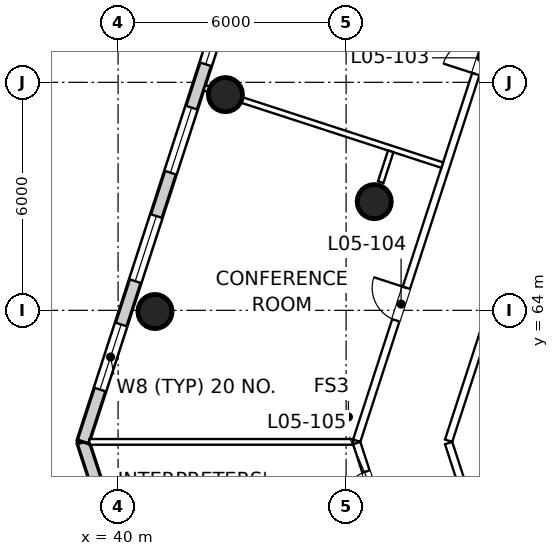
"""IFC4 building model, lengths in metres.
Left out: names, types, materials, properties, quantities, classifications, styles, units other than length and angle.
Written with IfcOpenShell. Run it as: python <this file> out.ifc"""

import sys

from ifc_helpers import new_model, si_unit, direction, frame, frame_2d, origin, origin_2d, place, context, subcontext, project, spatial, rectangle, circle, extrude, element, fill, save


model = new_model("IFC4")
c1 = context("Model", 3, precision=1e-05, world=origin(), true_north=direction((0.0, 1.0)))
c2 = subcontext(c1, "Body", "Model", "MODEL_VIEW")
j1 = project(units=[si_unit("LENGTHUNIT", "METRE"), si_unit("PLANEANGLEUNIT", "RADIAN")], contexts=[c1])
p1 = place(None, origin())
s1 = spatial("IfcSite", under=j1, at=p1, CompositionType="ELEMENT")
p2 = place(p1, origin())
s2 = spatial("IfcBuilding", under=s1, at=p2, CompositionType="ELEMENT")
p3 = place(p2, frame((0.0, 0.0, 34.0)))
s3 = spatial("IfcBuildingStorey", under=s2, at=p3, CompositionType="ELEMENT", Elevation=34.0)
for number, where, z_axis, x_axis in (
    (1, (46.74, 66.86, 0.0), (0.0, 0.0, 1.0), (1.0, 0.0, 0.0)),
    (2, (42.824, 69.676, 0.0), (0.0, 0.0, 1.0), (1.0, 0.0, 0.0)),
    (3, (40.97, 63.969, 0.0), (0.0, 0.0, 1.0), (1.0, 0.0, 0.0)),
):
    element("IfcColumn", number, at=place(p3, frame(where, z_axis=z_axis, x_axis=x_axis)), inside=s3, PredefinedType="COLUMN", context=c2, shape_type="SweptSolid", body=[
        extrude(circle(Radius=0.45, at=origin_2d()), origin(), (0.0, 0.0, 1.0), 5.0),
    ])
p4 = place(p3, frame((39.077, 60.539, 0.0), z_axis=(0.0, 0.0, 1.0), x_axis=(0.309036002497, -0.951050339972, 0.0)))
e4 = element("IfcWall", 4, at=p4, inside=s3, PredefinedType="SOLIDWALL", context=c2, shape_type="SweptSolid", body=[
    extrude(rectangle(XDim=1.764, YDim=0.32, at=frame_2d((0.882, 0.0))), origin(), (0.0, 0.0, 1.0), 4.6),
])
p5 = place(p3, frame((47.017, 84.976, 0.0), z_axis=(0.0, 0.0, 1.0), x_axis=(-0.309015385889, -0.951057038922, 0.0)))
e5 = element("IfcWall", 5, at=p5, inside=s3, PredefinedType="SOLIDWALL", context=c2, shape_type="SweptSolid", body=[
    extrude(rectangle(XDim=25.694, YDim=0.32, at=frame_2d((12.847, 0.0))), origin(), (0.0, 0.0, 1.0), 4.6),
])
p6 = place(p5, frame((1.447, 0.0, 0.9)))
e6 = element("IfcOpeningElement", 6, at=p6, cuts=e5, PredefinedType="OPENING", context=c2, shape_type="SweptSolid", body=[
    extrude(rectangle(XDim=1.8, YDim=2.1, at=frame_2d((0.9, 1.05))), frame((0.0, 0.17, 0.0), z_axis=(0.0, -1.0, 0.0), x_axis=(1.0, 0.0, 0.0)), (0.0, 0.0, 1.0), 0.34),
])
p7 = place(p5, frame((4.447, 0.0, 0.9)))
e7 = element("IfcOpeningElement", 7, at=p7, cuts=e5, PredefinedType="OPENING", context=c2, shape_type="SweptSolid", body=[
    extrude(rectangle(XDim=1.8, YDim=2.1, at=frame_2d((0.9, 1.05))), frame((0.0, 0.17, 0.0), z_axis=(0.0, -1.0, 0.0), x_axis=(1.0, 0.0, 0.0)), (0.0, 0.0, 1.0), 0.34),
])
p8 = place(p5, frame((7.447, 0.0, 0.9)))
e8 = element("IfcOpeningElement", 8, at=p8, cuts=e5, PredefinedType="OPENING", context=c2, shape_type="SweptSolid", body=[
    extrude(rectangle(XDim=1.8, YDim=2.1, at=frame_2d((0.9, 1.05))), frame((0.0, 0.17, 0.0), z_axis=(0.0, -1.0, 0.0), x_axis=(1.0, 0.0, 0.0)), (0.0, 0.0, 1.0), 0.34),
])
p9 = place(p5, frame((10.447, 0.0, 0.9)))
e9 = element("IfcOpeningElement", 9, at=p9, cuts=e5, PredefinedType="OPENING", context=c2, shape_type="SweptSolid", body=[
    extrude(rectangle(XDim=1.8, YDim=2.1, at=frame_2d((0.9, 1.05))), frame((0.0, 0.17, 0.0), z_axis=(0.0, -1.0, 0.0), x_axis=(1.0, 0.0, 0.0)), (0.0, 0.0, 1.0), 0.34),
])
p10 = place(p5, frame((13.447, 0.0, 0.9)))
e10 = element("IfcOpeningElement", 10, at=p10, cuts=e5, PredefinedType="OPENING", context=c2, shape_type="SweptSolid", body=[
    extrude(rectangle(XDim=1.8, YDim=2.1, at=frame_2d((0.9, 1.05))), frame((0.0, 0.17, 0.0), z_axis=(0.0, -1.0, 0.0), x_axis=(1.0, 0.0, 0.0)), (0.0, 0.0, 1.0), 0.34),
])
p11 = place(p5, frame((16.447, 0.0, 0.9)))
e11 = element("IfcOpeningElement", 11, at=p11, cuts=e5, PredefinedType="OPENING", context=c2, shape_type="SweptSolid", body=[
    extrude(rectangle(XDim=1.8, YDim=2.1, at=frame_2d((0.9, 1.05))), frame((0.0, 0.17, 0.0), z_axis=(0.0, -1.0, 0.0), x_axis=(1.0, 0.0, 0.0)), (0.0, 0.0, 1.0), 0.34),
])
p12 = place(p5, frame((19.447, 0.0, 0.9)))
e12 = element("IfcOpeningElement", 12, at=p12, cuts=e5, PredefinedType="OPENING", context=c2, shape_type="SweptSolid", body=[
    extrude(rectangle(XDim=1.8, YDim=2.1, at=frame_2d((0.9, 1.05))), frame((0.0, 0.17, 0.0), z_axis=(0.0, -1.0, 0.0), x_axis=(1.0, 0.0, 0.0)), (0.0, 0.0, 1.0), 0.34),
])
p13 = place(p5, frame((22.447, 0.0, 0.9)))
e13 = element("IfcOpeningElement", 13, at=p13, cuts=e5, PredefinedType="OPENING", context=c2, shape_type="SweptSolid", body=[
    extrude(rectangle(XDim=1.8, YDim=2.1, at=frame_2d((0.9, 1.05))), frame((0.0, 0.17, 0.0), z_axis=(0.0, -1.0, 0.0), x_axis=(1.0, 0.0, 0.0)), (0.0, 0.0, 1.0), 0.34),
])
p14 = place(p3, frame((48.757, 52.882, 0.0), z_axis=(0.0, 0.0, 1.0), x_axis=(-0.309030308026, 0.951052190325, 0.0)))
e14 = element("IfcWall", 14, at=p14, inside=s3, PredefinedType="PARTITIONING", context=c2, shape_type="SweptSolid", body=[
    extrude(rectangle(XDim=8.019, YDim=0.2, at=frame_2d((4.009, 0.0))), origin(), (0.0, 0.0, 1.0), 3.9),
])
p15 = place(p14, frame((6.33, 0.0, 0.0)))
e15 = element("IfcOpeningElement", 15, at=p15, cuts=e14, PredefinedType="OPENING", context=c2, shape_type="SweptSolid", body=[
    extrude(rectangle(XDim=0.9, YDim=2.1, at=frame_2d((0.45, 1.05))), frame((0.0, 0.11, 0.0), z_axis=(0.0, -1.0, 0.0), x_axis=(1.0, 0.0, 0.0)), (0.0, 0.0, 1.0), 0.22),
])
p16 = place(p14, frame((2.288, 0.0, 0.0)))
e16 = element("IfcOpeningElement", 16, at=p16, cuts=e14, PredefinedType="OPENING", context=c2, shape_type="SweptSolid", body=[
    extrude(rectangle(XDim=0.9, YDim=2.1, at=frame_2d((0.45, 1.05))), frame((0.0, 0.11, 0.0), z_axis=(0.0, -1.0, 0.0), x_axis=(1.0, 0.0, 0.0)), (0.0, 0.0, 1.0), 0.22),
])
p17 = place(p3, frame((46.279, 60.57, 0.0), z_axis=(0.0, 0.0, 1.0), x_axis=(0.309020575415, 0.951055352737, 0.0)))
e17 = element("IfcWall", 17, at=p17, inside=s3, PredefinedType="PARTITIONING", context=c2, shape_type="SweptSolid", body=[
    extrude(rectangle(XDim=21.409, YDim=0.2, at=frame_2d((10.704, 0.0))), origin(), (0.0, 0.0, 1.0), 3.9),
])
p18 = place(p17, frame((20.005, 0.0, 0.0)))
e18 = element("IfcOpeningElement", 18, at=p18, cuts=e17, PredefinedType="OPENING", context=c2, shape_type="SweptSolid", body=[
    extrude(rectangle(XDim=0.8, YDim=2.1, at=frame_2d((0.4, 1.05))), frame((0.0, 0.11, 0.0), z_axis=(0.0, -1.0, 0.0), x_axis=(1.0, 0.0, 0.0)), (0.0, 0.0, 1.0), 0.22),
])
p19 = place(p17, frame((16.142, 0.0, 0.0)))
e19 = element("IfcOpeningElement", 19, at=p19, cuts=e17, PredefinedType="OPENING", context=c2, shape_type="SweptSolid", body=[
    extrude(rectangle(XDim=0.9, YDim=2.1, at=frame_2d((0.45, 1.05))), frame((0.0, 0.11, 0.0), z_axis=(0.0, -1.0, 0.0), x_axis=(1.0, 0.0, 0.0)), (0.0, 0.0, 1.0), 0.22),
])
p20 = place(p17, frame((10.142, 0.0, 0.0)))
e20 = element("IfcOpeningElement", 20, at=p20, cuts=e17, PredefinedType="OPENING", context=c2, shape_type="SweptSolid", body=[
    extrude(rectangle(XDim=0.9, YDim=2.1, at=frame_2d((0.45, 1.05))), frame((0.0, 0.11, 0.0), z_axis=(0.0, -1.0, 0.0), x_axis=(1.0, 0.0, 0.0)), (0.0, 0.0, 1.0), 0.22),
])
p21 = place(p17, frame((3.33, 0.0, 0.0)))
e21 = element("IfcOpeningElement", 21, at=p21, cuts=e17, PredefinedType="OPENING", context=c2, shape_type="SweptSolid", body=[
    extrude(rectangle(XDim=0.9, YDim=2.1, at=frame_2d((0.45, 1.05))), frame((0.0, 0.11, 0.0), z_axis=(0.0, -1.0, 0.0), x_axis=(1.0, 0.0, 0.0)), (0.0, 0.0, 1.0), 0.22),
])
p22 = place(p3, frame((54.566, 78.631, 0.0), z_axis=(0.0, 0.0, 1.0), x_axis=(-0.309021827521, -0.951054945897, 0.0)))
e22 = element("IfcWall", 22, at=p22, inside=s3, PredefinedType="PARTITIONING", context=c2, shape_type="SweptSolid", body=[
    extrude(rectangle(XDim=18.99, YDim=0.2, at=frame_2d((9.495, 0.0))), origin(), (0.0, 0.0, 1.0), 4.6),
])
p23 = place(p3, frame((48.698, 60.508, 0.0), z_axis=(0.0, 0.0, 1.0), x_axis=(0.308999759659, -0.951062116021, 0.0)))
e23 = element("IfcWall", 23, at=p23, inside=s3, PredefinedType="PARTITIONING", context=c2, shape_type="SweptSolid", body=[
    extrude(rectangle(XDim=6.524, YDim=0.2, at=frame_2d((3.262, 0.0))), origin(), (0.0, 0.0, 1.0), 4.6),
])
p24 = place(p3, frame((39.245, 60.539, 0.0), z_axis=(0.0, 0.0, 1.0), x_axis=(1.0, 0.0, 0.0)))
e24 = element("IfcWall", 24, at=p24, inside=s3, PredefinedType="PARTITIONING", context=c2, shape_type="SweptSolid", body=[
    extrude(rectangle(XDim=6.939, YDim=0.15, at=frame_2d((3.469, 0.0))), origin(), (0.0, 0.0, 1.0), 3.9),
])
p25 = place(p3, frame((42.272, 69.855, 0.0), z_axis=(0.0, 0.0, 1.0), x_axis=(0.951049337045, -0.309039088961, 0.0)))
e25 = element("IfcWall", 25, at=p25, inside=s3, PredefinedType="PARTITIONING", context=c2, shape_type="SweptSolid", body=[
    extrude(rectangle(XDim=6.58, YDim=0.15, at=frame_2d((3.29, 0.0))), origin(), (0.0, 0.0, 1.0), 4.1),
])
p26 = place(p3, frame((46.911, 67.372, 0.0), z_axis=(0.0, 0.0, 1.0), x_axis=(0.309176694926, 0.951004611616, 0.0)))
e26 = element("IfcWall", 26, at=p26, inside=s3, PredefinedType="PARTITIONING", context=c2, shape_type="SweptSolid", body=[
    extrude(rectangle(XDim=0.853, YDim=0.15, at=frame_2d((0.426, 0.0))), origin(), (0.0, 0.0, 1.0), 4.1),
])
p27 = place(p10, origin())
e27 = element("IfcWindow", 27, at=p27, inside=s3, PartitioningType="SINGLE_PANEL", PredefinedType="WINDOW", context=c2, shape_type="SweptSolid", body=[
    extrude(rectangle(XDim=1.8, YDim=2.1, at=frame_2d((0.9, 1.05))), frame((0.0, 0.07, 0.0), z_axis=(0.0, -1.0, 0.0), x_axis=(1.0, 0.0, 0.0)), (0.0, 0.0, 1.0), 0.06),
])
fill(e10, e27)
p28 = place(p11, origin())
e28 = element("IfcWindow", 28, at=p28, inside=s3, PartitioningType="SINGLE_PANEL", PredefinedType="WINDOW", context=c2, shape_type="SweptSolid", body=[
    extrude(rectangle(XDim=1.8, YDim=2.1, at=frame_2d((0.9, 1.05))), frame((0.0, 0.07, 0.0), z_axis=(0.0, -1.0, 0.0), x_axis=(1.0, 0.0, 0.0)), (0.0, 0.0, 1.0), 0.06),
])
fill(e11, e28)
p29 = place(p12, origin())
e29 = element("IfcWindow", 29, at=p29, inside=s3, PartitioningType="SINGLE_PANEL", PredefinedType="WINDOW", context=c2, shape_type="SweptSolid", body=[
    extrude(rectangle(XDim=1.8, YDim=2.1, at=frame_2d((0.9, 1.05))), frame((0.0, 0.07, 0.0), z_axis=(0.0, -1.0, 0.0), x_axis=(1.0, 0.0, 0.0)), (0.0, 0.0, 1.0), 0.06),
])
fill(e12, e29)
p30 = place(p13, origin())
e30 = element("IfcWindow", 30, at=p30, inside=s3, PartitioningType="SINGLE_PANEL", PredefinedType="WINDOW", context=c2, shape_type="SweptSolid", body=[
    extrude(rectangle(XDim=1.8, YDim=2.1, at=frame_2d((0.9, 1.05))), frame((0.0, 0.07, 0.0), z_axis=(0.0, -1.0, 0.0), x_axis=(1.0, 0.0, 0.0)), (0.0, 0.0, 1.0), 0.06),
])
fill(e13, e30)
p31 = place(p20, origin())
e31 = element("IfcDoor", 31, at=p31, inside=s3, OperationType="SINGLE_SWING_LEFT", PredefinedType="DOOR", context=c2, shape_type="SweptSolid", body=[
    extrude(rectangle(XDim=0.9, YDim=2.1, at=frame_2d((0.45, 1.05))), frame((0.0, 0.025, 0.0), z_axis=(0.0, -1.0, 0.0), x_axis=(1.0, 0.0, 0.0)), (0.0, 0.0, 1.0), 0.05),
])
fill(e20, e31)
p32 = place(p21, origin())
e32 = element("IfcDoor", 32, at=p32, inside=s3, OperationType="SINGLE_SWING_RIGHT", PredefinedType="DOOR", context=c2, shape_type="SweptSolid", body=[
    extrude(rectangle(XDim=0.9, YDim=2.1, at=frame_2d((0.45, 1.05))), frame((0.0, 0.025, 0.0), z_axis=(0.0, -1.0, 0.0), x_axis=(1.0, 0.0, 0.0)), (0.0, 0.0, 1.0), 0.05),
])
fill(e21, e32)
p33 = place(p15, origin())
e33 = element("IfcDoor", 33, at=p33, inside=s3, OperationType="SINGLE_SWING_LEFT", PredefinedType="DOOR", context=c2, shape_type="SweptSolid", body=[
    extrude(rectangle(XDim=0.9, YDim=2.1, at=frame_2d((0.45, 1.05))), frame((0.0, 0.025, 0.0), z_axis=(0.0, -1.0, 0.0), x_axis=(1.0, 0.0, 0.0)), (0.0, 0.0, 1.0), 0.05),
])
fill(e15, e33)
save(model, sys.argv[1])
